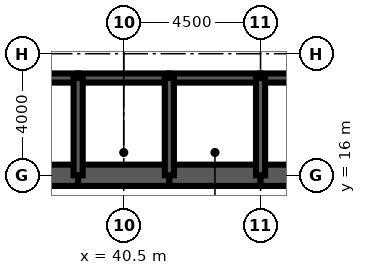
"""IFC4 building model, lengths in metres.
Left out: names, types, materials, properties, quantities, classifications, styles, units other than length and angle.
Written with IfcOpenShell. Run it as: python <this file> out.ifc"""

import sys

from ifc_helpers import new_model, si_unit, direction, frame, frame_2d, origin, place, context, subcontext, project, spatial, rectangle, extrude, element, fill, save


model = new_model("IFC4")
c1 = context("Model", 3, precision=1e-05, world=origin(), true_north=direction((0.0, 1.0)))
c2 = subcontext(c1, "Body", "Model", "MODEL_VIEW")
j1 = project(units=[si_unit("LENGTHUNIT", "METRE"), si_unit("PLANEANGLEUNIT", "RADIAN")], contexts=[c1])
p1 = place(None, origin())
s1 = spatial("IfcSite", under=j1, at=p1, CompositionType="ELEMENT")
p2 = place(p1, origin())
s2 = spatial("IfcBuilding", under=s1, at=p2, CompositionType="ELEMENT")
p3 = place(p2, frame((0.0, 0.0, 271.1)))
s3 = spatial("IfcBuildingStorey", under=s2, at=p3, CompositionType="ELEMENT", Elevation=271.1)
for number, where, z_axis, x_axis in (
    (1, (36.0, 16.0, 0.0), (0.0, 0.0, 1.0), (1.0, 0.0, 0.0)),
    (2, (39.0, 16.0, 0.0), (0.0, 0.0, 1.0), (1.0, 0.0, 0.0)),
    (3, (42.0, 16.0, 0.0), (0.0, 0.0, 1.0), (1.0, 0.0, 0.0)),
):
    element("IfcWall", number, at=place(p3, frame(where, z_axis=z_axis, x_axis=x_axis)), inside=s3, PredefinedType="SHEAR", context=c2, shape_type="SweptSolid", body=[
        extrude(rectangle(XDim=3.0, YDim=0.7, at=frame_2d((1.5, 0.0))), origin(), (0.0, 0.0, 1.0), 4.2),
    ])
p4 = place(p3, frame((45.0, 16.0, 0.0), z_axis=(0.0, 0.0, 1.0), x_axis=(1.0, 0.0, 0.0)))
e4 = element("IfcWall", 4, at=p4, inside=s3, PredefinedType="SHEAR", context=c2, shape_type="SweptSolid", body=[
    extrude(rectangle(XDim=9.35, YDim=0.7, at=frame_2d((4.675, 0.0))), origin(), (0.0, 0.0, 1.0), 4.2),
])
p5 = place(p3, frame((36.0, 19.2, 0.0), z_axis=(0.0, 0.0, 1.0), x_axis=(1.0, 0.0, 0.0)))
e5 = element("IfcWall", 5, at=p5, inside=s3, PredefinedType="SOLIDWALL", context=c2, shape_type="SweptSolid", body=[
    extrude(rectangle(XDim=3.0, YDim=0.3, at=frame_2d((1.5, 0.0))), origin(), (0.0, 0.0, 1.0), 4.2),
])
p6 = place(p5, frame((0.95, 0.0, 0.0)))
e6 = element("IfcOpeningElement", 6, at=p6, cuts=e5, PredefinedType="OPENING", context=c2, shape_type="SweptSolid", body=[
    extrude(rectangle(XDim=1.1, YDim=2.2, at=frame_2d((0.55, 1.1))), frame((0.0, 0.16, 0.0), z_axis=(0.0, -1.0, 0.0), x_axis=(1.0, 0.0, 0.0)), (0.0, 0.0, 1.0), 0.32),
])
p7 = place(p3, frame((39.0, 19.2, 0.0), z_axis=(0.0, 0.0, 1.0), x_axis=(1.0, 0.0, 0.0)))
e7 = element("IfcWall", 7, at=p7, inside=s3, PredefinedType="SOLIDWALL", context=c2, shape_type="SweptSolid", body=[
    extrude(rectangle(XDim=3.0, YDim=0.3, at=frame_2d((1.5, 0.0))), origin(), (0.0, 0.0, 1.0), 4.2),
])
p8 = place(p7, frame((1.0, 0.0, 0.0)))
e8 = element("IfcOpeningElement", 8, at=p8, cuts=e7, PredefinedType="OPENING", context=c2, shape_type="SweptSolid", body=[
    extrude(rectangle(XDim=1.0, YDim=2.1, at=frame_2d((0.5, 1.05))), frame((0.0, 0.16, 0.0), z_axis=(0.0, -1.0, 0.0), x_axis=(1.0, 0.0, 0.0)), (0.0, 0.0, 1.0), 0.32),
])
p9 = place(p3, frame((42.0, 19.2, 0.0), z_axis=(0.0, 0.0, 1.0), x_axis=(1.0, 0.0, 0.0)))
e9 = element("IfcWall", 9, at=p9, inside=s3, PredefinedType="SOLIDWALL", context=c2, shape_type="SweptSolid", body=[
    extrude(rectangle(XDim=3.0, YDim=0.3, at=frame_2d((1.5, 0.0))), origin(), (0.0, 0.0, 1.0), 4.2),
])
p10 = place(p9, frame((1.0, 0.0, 0.0)))
e10 = element("IfcOpeningElement", 10, at=p10, cuts=e9, PredefinedType="OPENING", context=c2, shape_type="SweptSolid", body=[
    extrude(rectangle(XDim=1.0, YDim=2.1, at=frame_2d((0.5, 1.05))), frame((0.0, 0.16, 0.0), z_axis=(0.0, -1.0, 0.0), x_axis=(1.0, 0.0, 0.0)), (0.0, 0.0, 1.0), 0.32),
])
p11 = place(p3, frame((45.0, 19.2, 0.0), z_axis=(0.0, 0.0, 1.0), x_axis=(1.0, 0.0, 0.0)))
e11 = element("IfcWall", 11, at=p11, inside=s3, PredefinedType="SOLIDWALL", context=c2, shape_type="SweptSolid", body=[
    extrude(rectangle(XDim=9.0, YDim=0.3, at=frame_2d((4.5, 0.0))), origin(), (0.0, 0.0, 1.0), 4.2),
])
p12 = place(p11, frame((7.35, 0.0, 0.0)))
e12 = element("IfcOpeningElement", 12, at=p12, cuts=e11, PredefinedType="OPENING", context=c2, shape_type="SweptSolid", body=[
    extrude(rectangle(XDim=1.0, YDim=2.1, at=frame_2d((0.5, 1.05))), frame((0.0, 0.16, 0.0), z_axis=(0.0, -1.0, 0.0), x_axis=(1.0, 0.0, 0.0)), (0.0, 0.0, 1.0), 0.32),
])
for number, where, z_axis, x_axis in (
    (13, (39.0, 16.0, 0.0), (0.0, 0.0, 1.0), (0.0, 1.0, 0.0)),
    (14, (42.0, 16.0, 0.0), (0.0, 0.0, 1.0), (0.0, 1.0, 0.0)),
    (15, (45.0, 16.0, 0.0), (0.0, 0.0, 1.0), (0.0, 1.0, 0.0)),
):
    element("IfcWall", number, at=place(p3, frame(where, z_axis=z_axis, x_axis=x_axis)), inside=s3, PredefinedType="SOLIDWALL", context=c2, shape_type="SweptSolid", body=[
        extrude(rectangle(XDim=3.2, YDim=0.3, at=frame_2d((1.6, 0.0))), origin(), (0.0, 0.0, 1.0), 4.2),
    ])
p13 = place(p3, frame((39.15, 17.3, 0.0), z_axis=(0.0, 0.0, 1.0), x_axis=(1.0, 0.0, 0.0)))
e16 = element("IfcWall", 16, at=p13, inside=s3, PredefinedType="SOLIDWALL", context=c2, shape_type="SweptSolid", body=[
    extrude(rectangle(XDim=2.7, YDim=0.3, at=frame_2d((1.35, 0.0))), origin(), (0.0, 0.0, 1.0), 4.04),
])
p14 = place(p13, frame((0.85, 0.0, 0.0)))
e17 = element("IfcOpeningElement", 17, at=p14, cuts=e16, PredefinedType="OPENING", context=c2, shape_type="SweptSolid", body=[
    extrude(rectangle(XDim=1.0, YDim=2.1, at=frame_2d((0.5, 1.05))), frame((0.0, 0.16, 0.0), z_axis=(0.0, -1.0, 0.0), x_axis=(1.0, 0.0, 0.0)), (0.0, 0.0, 1.0), 0.32),
])
p15 = place(p3, frame((42.15, 17.3, 0.0), z_axis=(0.0, 0.0, 1.0), x_axis=(1.0, 0.0, 0.0)))
e18 = element("IfcWall", 18, at=p15, inside=s3, PredefinedType="SOLIDWALL", context=c2, shape_type="SweptSolid", body=[
    extrude(rectangle(XDim=2.7, YDim=0.3, at=frame_2d((1.35, 0.0))), origin(), (0.0, 0.0, 1.0), 4.04),
])
p16 = place(p15, frame((0.85, 0.0, 0.0)))
e19 = element("IfcOpeningElement", 19, at=p16, cuts=e18, PredefinedType="OPENING", context=c2, shape_type="SweptSolid", body=[
    extrude(rectangle(XDim=1.0, YDim=2.1, at=frame_2d((0.5, 1.05))), frame((0.0, 0.16, 0.0), z_axis=(0.0, -1.0, 0.0), x_axis=(1.0, 0.0, 0.0)), (0.0, 0.0, 1.0), 0.32),
])
p17 = place(p14, origin())
e20 = element("IfcDoor", 20, at=p17, inside=s3, OperationType="SINGLE_SWING_LEFT", PredefinedType="DOOR", context=c2, shape_type="SweptSolid", body=[
    extrude(rectangle(XDim=1.0, YDim=2.1, at=frame_2d((0.5, 1.05))), frame((0.0, 0.025, 0.0), z_axis=(0.0, -1.0, 0.0), x_axis=(1.0, 0.0, 0.0)), (0.0, 0.0, 1.0), 0.05),
])
fill(e17, e20)
p18 = place(p16, origin())
e21 = element("IfcDoor", 21, at=p18, inside=s3, OperationType="SINGLE_SWING_LEFT", PredefinedType="DOOR", context=c2, shape_type="SweptSolid", body=[
    extrude(rectangle(XDim=1.0, YDim=2.1, at=frame_2d((0.5, 1.05))), frame((0.0, 0.025, 0.0), z_axis=(0.0, -1.0, 0.0), x_axis=(1.0, 0.0, 0.0)), (0.0, 0.0, 1.0), 0.05),
])
fill(e19, e21)
p19 = place(p8, origin())
e22 = element("IfcDoor", 22, at=p19, inside=s3, OperationType="SINGLE_SWING_LEFT", PredefinedType="DOOR", context=c2, shape_type="SweptSolid", body=[
    extrude(rectangle(XDim=1.0, YDim=2.1, at=frame_2d((0.5, 1.05))), frame((0.0, 0.025, 0.0), z_axis=(0.0, -1.0, 0.0), x_axis=(1.0, 0.0, 0.0)), (0.0, 0.0, 1.0), 0.05),
])
fill(e8, e22)
p20 = place(p10, origin())
e23 = element("IfcDoor", 23, at=p20, inside=s3, OperationType="SINGLE_SWING_LEFT", PredefinedType="DOOR", context=c2, shape_type="SweptSolid", body=[
    extrude(rectangle(XDim=1.0, YDim=2.1, at=frame_2d((0.5, 1.05))), frame((0.0, 0.025, 0.0), z_axis=(0.0, -1.0, 0.0), x_axis=(1.0, 0.0, 0.0)), (0.0, 0.0, 1.0), 0.05),
])
fill(e10, e23)
save(model, sys.argv[1])
